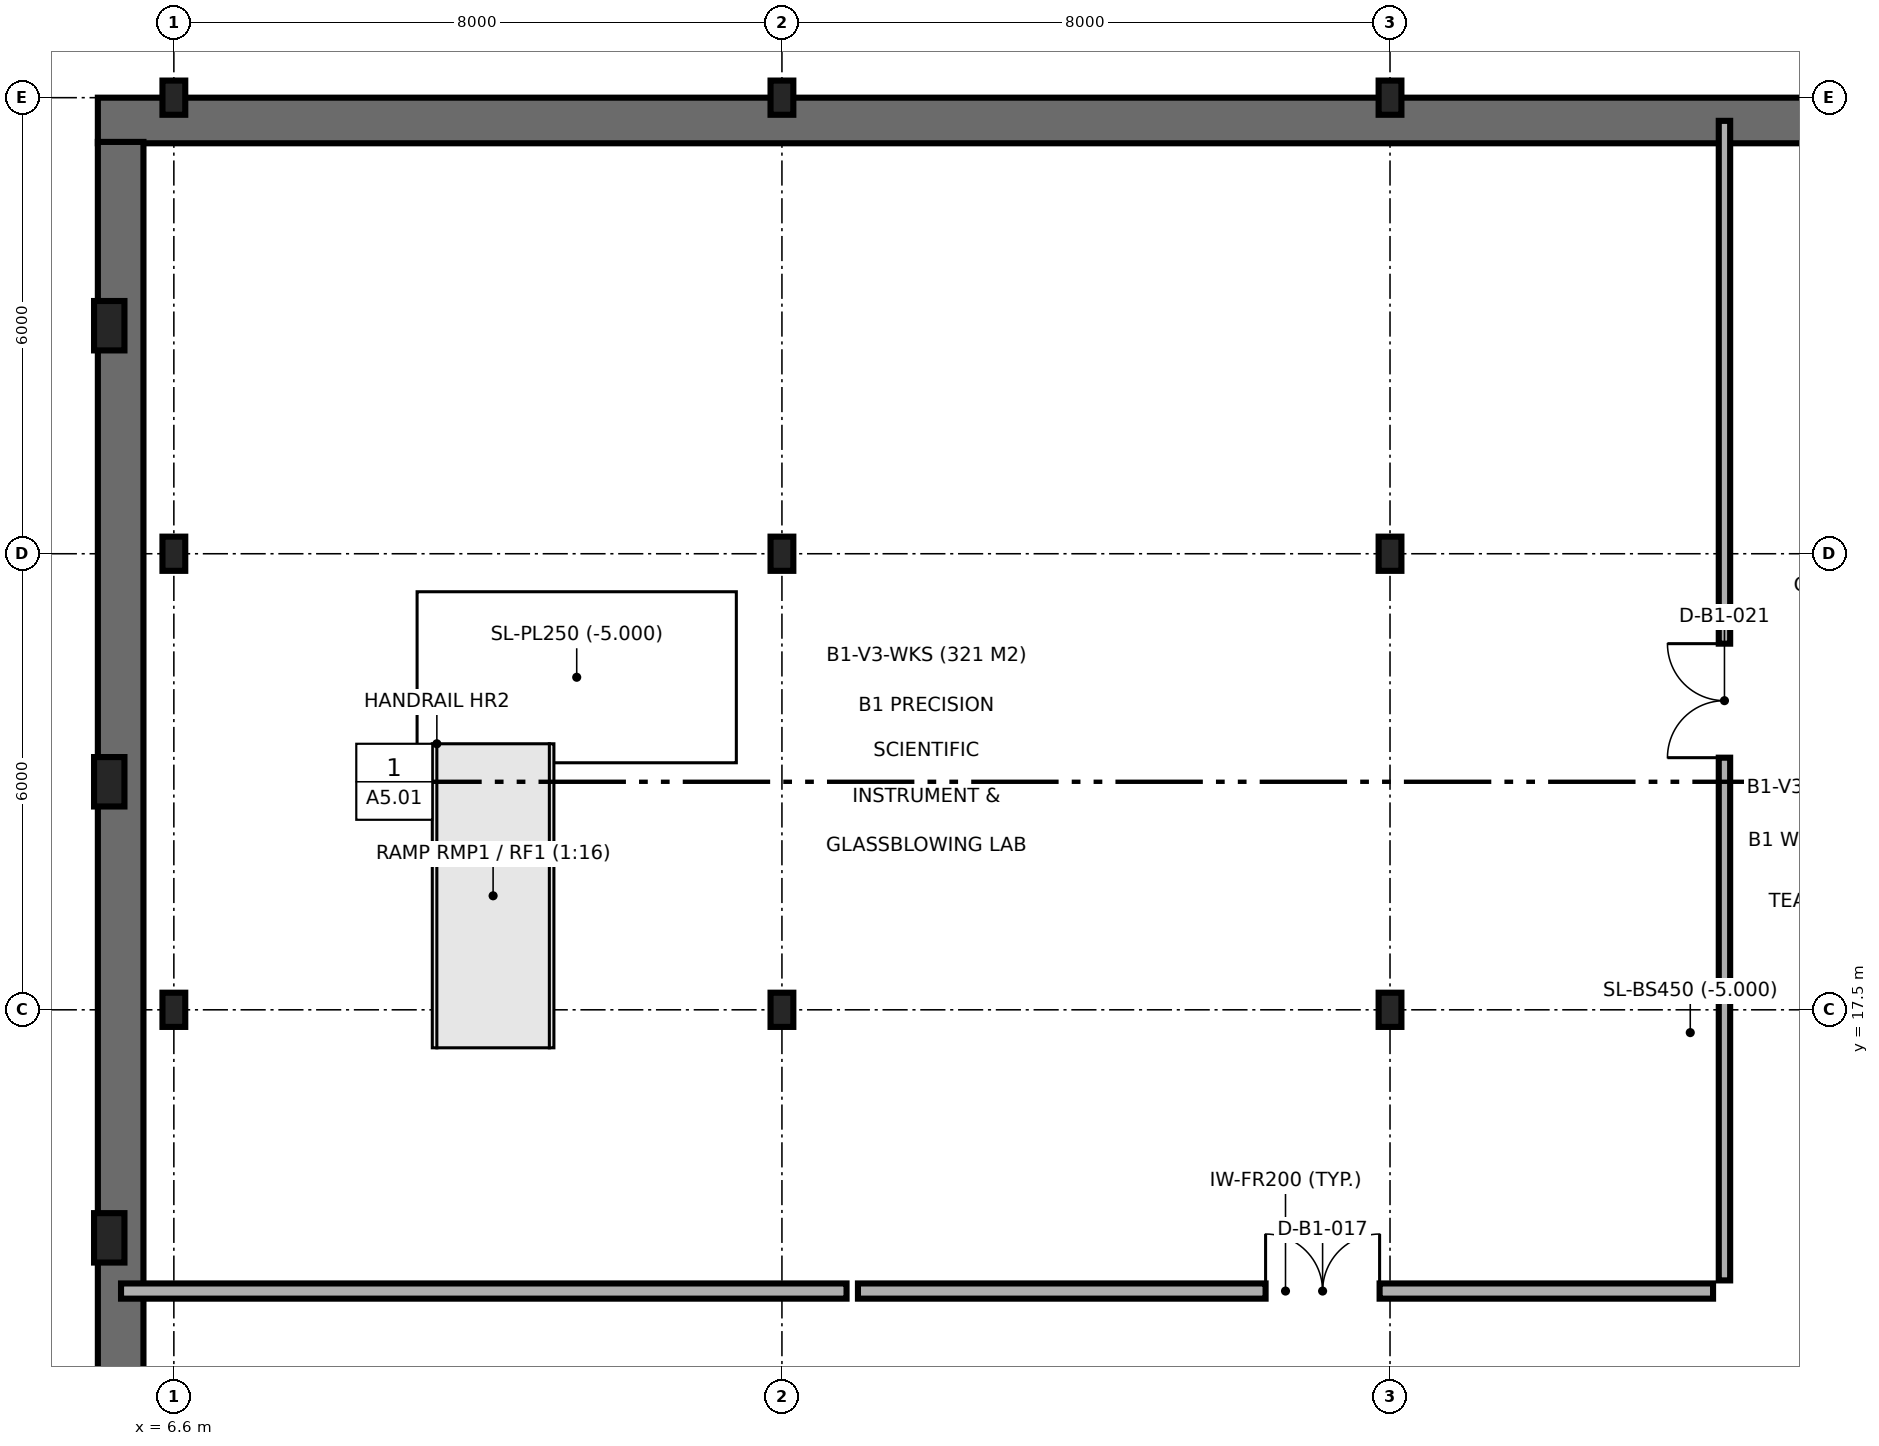
"""IFC4 building model, lengths in metres.
Left out: names, types, materials, properties, quantities, classifications, styles, units other than length and angle.
Written with IfcOpenShell. Run it as: python <this file> out.ifc"""

import sys

from ifc_helpers import new_model, si_unit, direction, frame, frame_2d, origin, origin_2d, place, context, subcontext, project, spatial, rectangle, i_section, extrude, element, fill, save


model = new_model("IFC4")
c1 = context("Model", 3, precision=1e-05, world=origin(), true_north=direction((0.0, 1.0)))
c2 = subcontext(c1, "Body", "Model", "MODEL_VIEW")
j1 = project(units=[si_unit("LENGTHUNIT", "METRE"), si_unit("PLANEANGLEUNIT", "RADIAN")], contexts=[c1])
p1 = place(None, origin())
s1 = spatial("IfcSite", under=j1, at=p1, CompositionType="ELEMENT")
p2 = place(p1, origin())
s2 = spatial("IfcBuilding", under=s1, at=p2, CompositionType="ELEMENT")
p3 = place(p2, frame((0.0, 0.0, -5.0)))
s3 = spatial("IfcBuildingStorey", under=s2, at=p3, CompositionType="ELEMENT", Elevation=-5.0)
for number, where, z_axis, x_axis in (
    (1, (5.75, 14.5, 0.0), (0.0, 0.0, 1.0), (1.0, 0.0, 0.0)),
    (2, (5.75, 20.5, 0.0), (0.0, 0.0, 1.0), (1.0, 0.0, 0.0)),
    (3, (5.75, 26.5, 0.0), (0.0, 0.0, 1.0), (1.0, 0.0, 0.0)),
):
    element("IfcColumn", number, at=place(p3, frame(where, z_axis=z_axis, x_axis=x_axis)), inside=s3, PredefinedType="PILASTER", context=c2, shape_type="SweptSolid", body=[
        extrude(rectangle(XDim=0.4, YDim=0.65, at=origin_2d()), origin(), (0.0, 0.0, 1.0), 5.0),
    ])
for number, where, z_axis, x_axis in (
    (4, (6.6, 17.5, 0.0), (0.0, 0.0, 1.0), (1.0, 0.0, 0.0)),
    (5, (6.6, 23.5, 0.0), (0.0, 0.0, 1.0), (1.0, 0.0, 0.0)),
    (6, (6.6, 29.5, 0.0), (0.0, 0.0, 1.0), (1.0, 0.0, 0.0)),
    (7, (14.6, 17.5, 0.0), (0.0, 0.0, 1.0), (1.0, 0.0, 0.0)),
    (8, (14.6, 23.5, 0.0), (0.0, 0.0, 1.0), (1.0, 0.0, 0.0)),
    (9, (14.6, 29.5, 0.0), (0.0, 0.0, 1.0), (1.0, 0.0, 0.0)),
    (10, (22.6, 17.5, 0.0), (0.0, 0.0, 1.0), (1.0, 0.0, 0.0)),
    (11, (22.6, 23.5, 0.0), (0.0, 0.0, 1.0), (1.0, 0.0, 0.0)),
    (12, (22.6, 29.5, 0.0), (0.0, 0.0, 1.0), (1.0, 0.0, 0.0)),
):
    element("IfcColumn", number, at=place(p3, frame(where, z_axis=z_axis, x_axis=x_axis)), inside=s3, PredefinedType="COLUMN", context=c2, shape_type="SweptSolid", body=[
        extrude(i_section(OverallWidth=0.3, OverallDepth=0.45, WebThickness=0.014, FlangeThickness=0.026, FilletRadius=0.027, at=origin_2d()), origin(), (0.0, 0.0, 1.0), 5.0),
    ])
p4 = place(p3, frame((31.182, 29.2, 0.0), z_axis=(0.0, 0.0, 1.0), x_axis=(-1.0, 0.0, 0.0)))
e13 = element("IfcWall", 13, at=p4, inside=s3, PredefinedType="SHEAR", context=c2, shape_type="SweptSolid", body=[
    extrude(rectangle(XDim=25.582, YDim=0.6, at=frame_2d((12.791, 0.0))), origin(), (0.0, 0.0, 1.0), 4.7),
])
p5 = place(p3, frame((5.9, 28.918, 0.0), z_axis=(0.0, 0.0, 1.0), x_axis=(0.0, -1.0, 0.0)))
e14 = element("IfcWall", 14, at=p5, inside=s3, PredefinedType="SHEAR", context=c2, shape_type="SweptSolid", body=[
    extrude(rectangle(XDim=24.018, YDim=0.6, at=frame_2d((12.009, 0.0))), origin(), (0.0, 0.0, 1.0), 4.7),
])
p6 = place(p3, frame((15.6, 13.8, 0.0), z_axis=(0.0, 0.0, 1.0), x_axis=(1.0, 0.0, 0.0)))
e15 = element("IfcWall", 15, at=p6, inside=s3, PredefinedType="SOLIDWALL", context=c2, shape_type="SweptSolid", body=[
    extrude(rectangle(XDim=11.25, YDim=0.2, at=frame_2d((5.625, 0.0))), origin(), (0.0, 0.0, 1.0), 4.7),
])
p7 = place(p6, frame((5.363, 0.0, 0.0)))
e16 = element("IfcOpeningElement", 16, at=p7, cuts=e15, PredefinedType="OPENING", context=c2, shape_type="SweptSolid", body=[
    extrude(rectangle(XDim=1.5, YDim=2.2, at=frame_2d((0.75, 1.1))), frame((0.0, 0.11, 0.0), z_axis=(0.0, -1.0, 0.0), x_axis=(1.0, 0.0, 0.0)), (0.0, 0.0, 1.0), 0.22),
])
p8 = place(p3, frame((5.905, 13.8, 0.0), z_axis=(0.0, 0.0, 1.0), x_axis=(1.0, 0.0, 0.0)))
e17 = element("IfcWall", 17, at=p8, inside=s3, PredefinedType="SOLIDWALL", context=c2, shape_type="SweptSolid", body=[
    extrude(rectangle(XDim=9.545, YDim=0.2, at=frame_2d((4.772, 0.0))), origin(), (0.0, 0.0, 1.0), 4.7),
])
p9 = place(p3, frame((27.0, 13.94, 0.0), z_axis=(0.0, 0.0, 1.0), x_axis=(0.0, 1.0, 0.0)))
e18 = element("IfcWall", 18, at=p9, inside=s3, PredefinedType="PARTITIONING", context=c2, shape_type="SweptSolid", body=[
    extrude(rectangle(XDim=15.255, YDim=0.15, at=frame_2d((7.627, 0.0))), origin(), (0.0, 0.0, 1.0), 4.7),
])
p10 = place(p9, frame((6.877, 0.0, 0.0)))
e19 = element("IfcOpeningElement", 19, at=p10, cuts=e18, PredefinedType="OPENING", context=c2, shape_type="SweptSolid", body=[
    extrude(rectangle(XDim=1.5, YDim=2.2, at=frame_2d((0.75, 1.1))), frame((0.0, 0.085, 0.0), z_axis=(0.0, -1.0, 0.0), x_axis=(1.0, 0.0, 0.0)), (0.0, 0.0, 1.0), 0.17),
])
p11 = place(p7, origin())
e20 = element("IfcDoor", 20, at=p11, inside=s3, OperationType="DOUBLE_DOOR_SINGLE_SWING", PredefinedType="DOOR", context=c2, shape_type="SweptSolid", body=[
    extrude(rectangle(XDim=1.5, YDim=2.2, at=frame_2d((0.75, 1.1))), frame((0.0, 0.025, 0.0), z_axis=(0.0, -1.0, 0.0), x_axis=(1.0, 0.0, 0.0)), (0.0, 0.0, 1.0), 0.05),
])
fill(e16, e20)
p12 = place(p10, origin())
e21 = element("IfcDoor", 21, at=p12, inside=s3, OperationType="DOUBLE_DOOR_SINGLE_SWING", PredefinedType="DOOR", context=c2, shape_type="SweptSolid", body=[
    extrude(rectangle(XDim=1.5, YDim=2.2, at=frame_2d((0.75, 1.1))), frame((0.0, 0.025, 0.0), z_axis=(0.0, -1.0, 0.0), x_axis=(1.0, 0.0, 0.0)), (0.0, 0.0, 1.0), 0.05),
])
fill(e19, e21)
save(model, sys.argv[1])
